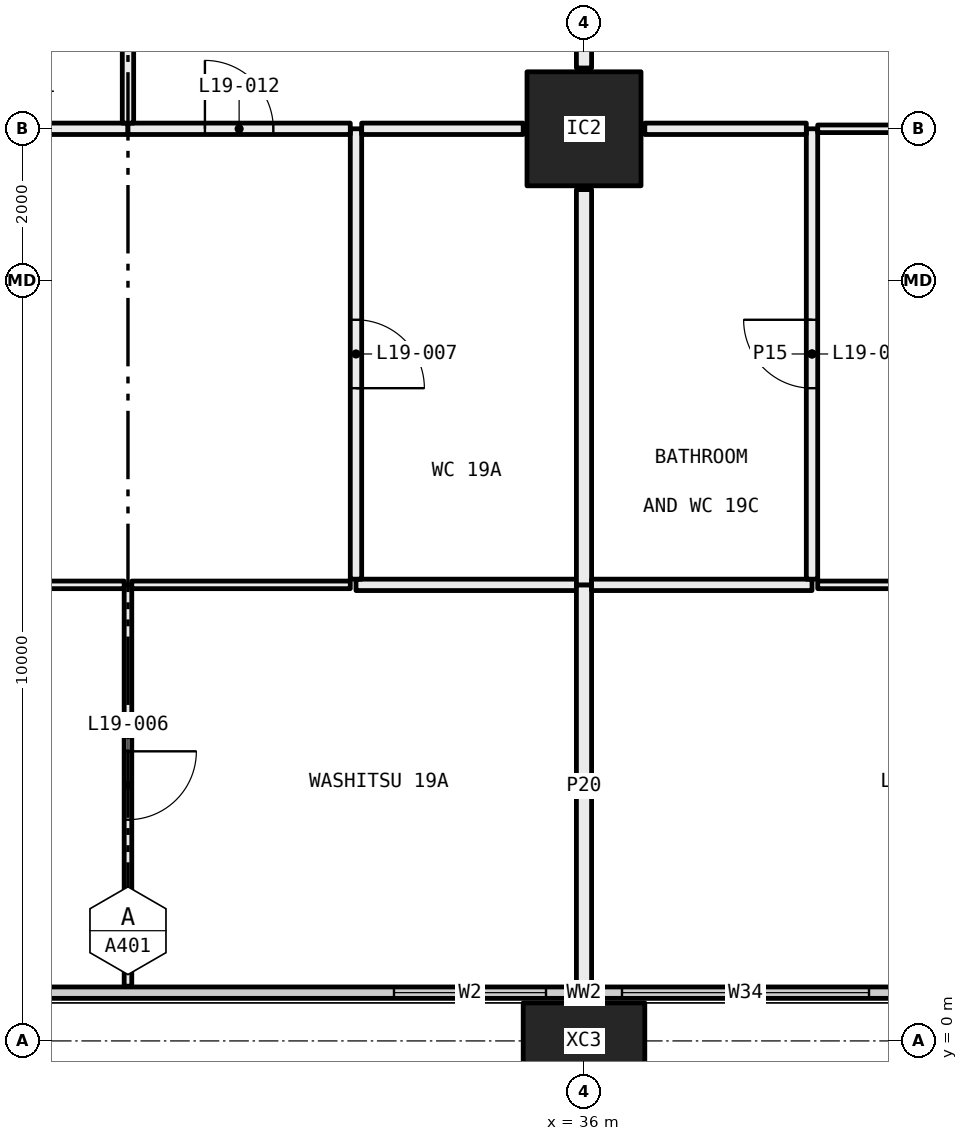
"""IFC4 building model, lengths in metres.
Left out: names, types, materials, properties, quantities, classifications, styles, units other than length and angle.
Written with IfcOpenShell. Run it as: python <this file> out.ifc"""

import sys

from ifc_helpers import new_model, si_unit, direction, frame, frame_2d, origin, origin_2d, place, context, subcontext, project, spatial, rectangle, hollow_rectangle, extrude, element, fill, save


model = new_model("IFC4")
c1 = context("Model", 3, precision=1e-05, world=origin(), true_north=direction((0.0, 1.0)))
c2 = subcontext(c1, "Body", "Model", "MODEL_VIEW")
j1 = project(units=[si_unit("LENGTHUNIT", "METRE"), si_unit("PLANEANGLEUNIT", "RADIAN")], contexts=[c1])
p1 = place(None, origin())
s1 = spatial("IfcSite", under=j1, at=p1, CompositionType="ELEMENT")
p2 = place(p1, origin())
s2 = spatial("IfcBuilding", under=s1, at=p2, CompositionType="ELEMENT")
p3 = place(p2, frame((0.0, 0.0, 78.3)))
s3 = spatial("IfcBuildingStorey", under=s2, at=p3, CompositionType="ELEMENT", Elevation=78.3)
p4 = place(p3, frame((36.0, 0.0, -0.4), z_axis=(0.0, 0.0, 1.0), x_axis=(1.0, 0.0, 0.0)))
e1 = element("IfcColumn", 1, at=p4, inside=s3, PredefinedType="COLUMN", context=c2, shape_type="SweptSolid", body=[
    extrude(hollow_rectangle(XDim=1.6, YDim=1.0, WallThickness=0.065, at=origin_2d()), origin(), (0.0, 0.0, 1.0), 3.45),
])
p5 = place(p3, frame((36.0, 12.0, 0.0), z_axis=(0.0, 0.0, 1.0), x_axis=(1.0, 0.0, 0.0)))
e2 = element("IfcColumn", 2, at=p5, inside=s3, PredefinedType="COLUMN", context=c2, shape_type="SweptSolid", body=[
    extrude(hollow_rectangle(XDim=1.5, YDim=1.5, WallThickness=0.065, at=origin_2d()), origin(), (0.0, 0.0, 1.0), 3.05),
])
p6 = place(p3, frame((6.56, 0.635, 0.0), z_axis=(0.0, 0.0, 1.0), x_axis=(1.0, 0.0, 0.0)))
e3 = element("IfcWall", 3, at=p6, inside=s3, PredefinedType="ELEMENTEDWALL", context=c2, shape_type="SweptSolid", body=[
    extrude(rectangle(XDim=58.88, YDim=0.15, at=frame_2d((29.44, 0.0))), origin(), (0.0, 0.0, 1.0), 3.05),
])
p7 = place(p6, frame((0.44, 0.0, 0.45)))
e4 = element("IfcOpeningElement", 4, at=p7, cuts=e3, PredefinedType="OPENING", context=c2, shape_type="SweptSolid", body=[
    extrude(rectangle(XDim=4.5, YDim=2.55, at=frame_2d((2.25, 1.275))), frame((0.0, 0.085, 0.0), z_axis=(0.0, -1.0, 0.0), x_axis=(1.0, 0.0, 0.0)), (0.0, 0.0, 1.0), 0.17),
])
p8 = place(p6, frame((5.94, 0.0, 0.45)))
e5 = element("IfcOpeningElement", 5, at=p8, cuts=e3, PredefinedType="OPENING", context=c2, shape_type="SweptSolid", body=[
    extrude(rectangle(XDim=3.25, YDim=2.55, at=frame_2d((1.625, 1.275))), frame((0.0, 0.085, 0.0), z_axis=(0.0, -1.0, 0.0), x_axis=(1.0, 0.0, 0.0)), (0.0, 0.0, 1.0), 0.17),
])
p9 = place(p6, frame((13.69, 0.0, 0.45)))
e6 = element("IfcOpeningElement", 6, at=p9, cuts=e3, PredefinedType="OPENING", context=c2, shape_type="SweptSolid", body=[
    extrude(rectangle(XDim=3.25, YDim=2.55, at=frame_2d((1.625, 1.275))), frame((0.0, 0.085, 0.0), z_axis=(0.0, -1.0, 0.0), x_axis=(1.0, 0.0, 0.0)), (0.0, 0.0, 1.0), 0.17),
])
p10 = place(p6, frame((17.94, 0.0, 0.45)))
e7 = element("IfcOpeningElement", 7, at=p10, cuts=e3, PredefinedType="OPENING", context=c2, shape_type="SweptSolid", body=[
    extrude(rectangle(XDim=3.25, YDim=2.55, at=frame_2d((1.625, 1.275))), frame((0.0, 0.085, 0.0), z_axis=(0.0, -1.0, 0.0), x_axis=(1.0, 0.0, 0.0)), (0.0, 0.0, 1.0), 0.17),
])
p11 = place(p6, frame((26.94, 0.0, 0.45)))
e8 = element("IfcOpeningElement", 8, at=p11, cuts=e3, PredefinedType="OPENING", context=c2, shape_type="SweptSolid", body=[
    extrude(rectangle(XDim=2.0, YDim=2.55, at=frame_2d((1.0, 1.275))), frame((0.0, 0.085, 0.0), z_axis=(0.0, -1.0, 0.0), x_axis=(1.0, 0.0, 0.0)), (0.0, 0.0, 1.0), 0.17),
])
p12 = place(p6, frame((29.94, 0.0, 0.45)))
e9 = element("IfcOpeningElement", 9, at=p12, cuts=e3, PredefinedType="OPENING", context=c2, shape_type="SweptSolid", body=[
    extrude(rectangle(XDim=3.25, YDim=2.55, at=frame_2d((1.625, 1.275))), frame((0.0, 0.085, 0.0), z_axis=(0.0, -1.0, 0.0), x_axis=(1.0, 0.0, 0.0)), (0.0, 0.0, 1.0), 0.17),
])
p13 = place(p6, frame((37.69, 0.0, 0.45)))
e10 = element("IfcOpeningElement", 10, at=p13, cuts=e3, PredefinedType="OPENING", context=c2, shape_type="SweptSolid", body=[
    extrude(rectangle(XDim=3.25, YDim=2.55, at=frame_2d((1.625, 1.275))), frame((0.0, 0.085, 0.0), z_axis=(0.0, -1.0, 0.0), x_axis=(1.0, 0.0, 0.0)), (0.0, 0.0, 1.0), 0.17),
])
p14 = place(p6, frame((41.94, 0.0, 0.45)))
e11 = element("IfcOpeningElement", 11, at=p14, cuts=e3, PredefinedType="OPENING", context=c2, shape_type="SweptSolid", body=[
    extrude(rectangle(XDim=3.25, YDim=2.55, at=frame_2d((1.625, 1.275))), frame((0.0, 0.085, 0.0), z_axis=(0.0, -1.0, 0.0), x_axis=(1.0, 0.0, 0.0)), (0.0, 0.0, 1.0), 0.17),
])
p15 = place(p6, frame((50.94, 0.0, 0.45)))
e12 = element("IfcOpeningElement", 12, at=p15, cuts=e3, PredefinedType="OPENING", context=c2, shape_type="SweptSolid", body=[
    extrude(rectangle(XDim=2.0, YDim=2.55, at=frame_2d((1.0, 1.275))), frame((0.0, 0.085, 0.0), z_axis=(0.0, -1.0, 0.0), x_axis=(1.0, 0.0, 0.0)), (0.0, 0.0, 1.0), 0.17),
])
p16 = place(p6, frame((53.94, 0.0, 0.45)))
e13 = element("IfcOpeningElement", 13, at=p16, cuts=e3, PredefinedType="OPENING", context=c2, shape_type="SweptSolid", body=[
    extrude(rectangle(XDim=4.5, YDim=2.55, at=frame_2d((2.25, 1.275))), frame((0.0, 0.085, 0.0), z_axis=(0.0, -1.0, 0.0), x_axis=(1.0, 0.0, 0.0)), (0.0, 0.0, 1.0), 0.17),
])
p17 = place(p3, frame((30.0, 0.72, 0.0), z_axis=(0.0, 0.0, 1.0), x_axis=(0.0, 1.0, 0.0)))
e14 = element("IfcWall", 14, at=p17, inside=s3, PredefinedType="PARTITIONING", context=c2, shape_type="SweptSolid", body=[
    extrude(rectangle(XDim=5.28, YDim=0.1, at=frame_2d((2.64, 0.0))), origin(), (0.0, 0.0, 1.0), 3.05),
])
p18 = place(p17, frame((2.19, 0.0, 0.0)))
e15 = element("IfcOpeningElement", 15, at=p18, cuts=e14, PredefinedType="OPENING", context=c2, shape_type="SweptSolid", body=[
    extrude(rectangle(XDim=0.9, YDim=2.1, at=frame_2d((0.45, 1.05))), frame((0.0, 0.06, 0.0), z_axis=(0.0, -1.0, 0.0), x_axis=(1.0, 0.0, 0.0)), (0.0, 0.0, 1.0), 0.12),
])
p19 = place(p3, frame((29.95, 6.0, 0.0), z_axis=(0.0, 0.0, 1.0), x_axis=(-1.0, 0.0, 0.0)))
e16 = element("IfcWall", 16, at=p19, inside=s3, PredefinedType="PARTITIONING", context=c2, shape_type="SweptSolid", body=[
    extrude(rectangle(XDim=6.05, YDim=0.1, at=frame_2d((3.025, 0.0))), origin(), (0.0, 0.0, 1.0), 2.45),
])
p20 = place(p19, frame((2.575, 0.0, 0.0)))
e17 = element("IfcOpeningElement", 17, at=p20, cuts=e16, PredefinedType="OPENING", context=c2, shape_type="SweptSolid", body=[
    extrude(rectangle(XDim=0.9, YDim=2.1, at=frame_2d((0.45, 1.05))), frame((0.0, 0.06, 0.0), z_axis=(0.0, -1.0, 0.0), x_axis=(1.0, 0.0, 0.0)), (0.0, 0.0, 1.0), 0.12),
])
p21 = place(p3, frame((32.925, 6.0, 0.0), z_axis=(0.0, 0.0, 1.0), x_axis=(-1.0, 0.0, 0.0)))
e18 = element("IfcWall", 18, at=p21, inside=s3, PredefinedType="PARTITIONING", context=c2, shape_type="SweptSolid", body=[
    extrude(rectangle(XDim=2.875, YDim=0.1, at=frame_2d((1.438, 0.0))), origin(), (0.0, 0.0, 1.0), 3.05),
])
p22 = place(p3, frame((35.9, 6.0, 0.0), z_axis=(0.0, 0.0, 1.0), x_axis=(-1.0, 0.0, 0.0)))
e19 = element("IfcWall", 19, at=p22, inside=s3, PredefinedType="PARTITIONING", context=c2, shape_type="SweptSolid", body=[
    extrude(rectangle(XDim=2.9, YDim=0.15, at=frame_2d((1.45, 0.0))), origin(), (0.0, 0.0, 1.0), 3.05),
])
p23 = place(p3, frame((36.0, 0.72, 0.0), z_axis=(0.0, 0.0, 1.0), x_axis=(0.0, 1.0, 0.0)))
e20 = element("IfcWall", 20, at=p23, inside=s3, PredefinedType="PARTITIONING", context=c2, shape_type="SweptSolid", body=[
    extrude(rectangle(XDim=5.28, YDim=0.2, at=frame_2d((2.64, 0.0))), origin(), (0.0, 0.0, 1.0), 2.45),
])
p24 = place(p3, frame((33.0, 6.075, 0.0), z_axis=(0.0, 0.0, 1.0), x_axis=(0.0, 1.0, 0.0)))
e21 = element("IfcWall", 21, at=p24, inside=s3, PredefinedType="PARTITIONING", context=c2, shape_type="SweptSolid", body=[
    extrude(rectangle(XDim=5.925, YDim=0.15, at=frame_2d((2.962, 0.0))), origin(), (0.0, 0.0, 1.0), 2.45),
])
p25 = place(p24, frame((2.512, 0.0, 0.0)))
e22 = element("IfcOpeningElement", 22, at=p25, cuts=e21, PredefinedType="OPENING", context=c2, shape_type="SweptSolid", body=[
    extrude(rectangle(XDim=0.9, YDim=2.1, at=frame_2d((0.45, 1.05))), frame((0.0, 0.085, 0.0), z_axis=(0.0, -1.0, 0.0), x_axis=(1.0, 0.0, 0.0)), (0.0, 0.0, 1.0), 0.17),
])
p26 = place(p3, frame((30.0, 12.0, 0.0), z_axis=(0.0, 0.0, 1.0), x_axis=(-1.0, 0.0, 0.0)))
e23 = element("IfcWall", 23, at=p26, inside=s3, PredefinedType="PARTITIONING", context=c2, shape_type="SweptSolid", body=[
    extrude(rectangle(XDim=3.0, YDim=0.15, at=frame_2d((1.5, 0.0))), origin(), (0.0, 0.0, 1.0), 2.45),
])
p27 = place(p26, frame((1.05, 0.0, 0.0)))
e24 = element("IfcOpeningElement", 24, at=p27, cuts=e23, PredefinedType="OPENING", context=c2, shape_type="SweptSolid", body=[
    extrude(rectangle(XDim=0.9, YDim=2.1, at=frame_2d((0.45, 1.05))), frame((0.0, 0.085, 0.0), z_axis=(0.0, -1.0, 0.0), x_axis=(1.0, 0.0, 0.0)), (0.0, 0.0, 1.0), 0.17),
])
p28 = place(p3, frame((32.925, 12.0, 0.0), z_axis=(0.0, 0.0, 1.0), x_axis=(-1.0, 0.0, 0.0)))
e25 = element("IfcWall", 25, at=p28, inside=s3, PredefinedType="PARTITIONING", context=c2, shape_type="SweptSolid", body=[
    extrude(rectangle(XDim=2.925, YDim=0.15, at=frame_2d((1.462, 0.0))), origin(), (0.0, 0.0, 1.0), 2.45),
])
p29 = place(p28, frame((1.012, 0.0, 0.0)))
e26 = element("IfcOpeningElement", 26, at=p29, cuts=e25, PredefinedType="OPENING", context=c2, shape_type="SweptSolid", body=[
    extrude(rectangle(XDim=0.9, YDim=2.1, at=frame_2d((0.45, 1.05))), frame((0.0, 0.085, 0.0), z_axis=(0.0, -1.0, 0.0), x_axis=(1.0, 0.0, 0.0)), (0.0, 0.0, 1.0), 0.17),
])
p30 = place(p3, frame((35.2, 12.0, 0.0), z_axis=(0.0, 0.0, 1.0), x_axis=(-1.0, 0.0, 0.0)))
e27 = element("IfcWall", 27, at=p30, inside=s3, PredefinedType="PARTITIONING", context=c2, shape_type="SweptSolid", body=[
    extrude(rectangle(XDim=2.125, YDim=0.15, at=frame_2d((1.062, 0.0))), origin(), (0.0, 0.0, 1.0), 2.45),
])
p31 = place(p3, frame((36.0, 6.0, 0.0), z_axis=(0.0, 0.0, 1.0), x_axis=(0.0, 1.0, 0.0)))
e28 = element("IfcWall", 28, at=p31, inside=s3, PredefinedType="PARTITIONING", context=c2, shape_type="SweptSolid", body=[
    extrude(rectangle(XDim=5.2, YDim=0.2, at=frame_2d((2.6, 0.0))), origin(), (0.0, 0.0, 1.0), 2.45),
])
p32 = place(p3, frame((30.0, 12.075, 0.0), z_axis=(0.0, 0.0, 1.0), x_axis=(0.0, 1.0, 0.0)))
e29 = element("IfcWall", 29, at=p32, inside=s3, PredefinedType="PARTITIONING", context=c2, shape_type="SweptSolid", body=[
    extrude(rectangle(XDim=5.925, YDim=0.15, at=frame_2d((2.962, 0.0))), origin(), (0.0, 0.0, 1.0), 2.45),
])
p33 = place(p3, frame((36.0, 12.8, 0.0), z_axis=(0.0, 0.0, 1.0), x_axis=(0.0, 1.0, 0.0)))
e30 = element("IfcWall", 30, at=p33, inside=s3, PredefinedType="PARTITIONING", context=c2, shape_type="SweptSolid", body=[
    extrude(rectangle(XDim=5.2, YDim=0.2, at=frame_2d((2.6, 0.0))), origin(), (0.0, 0.0, 1.0), 2.45),
])
p34 = place(p3, frame((39.0, 6.0, 0.0), z_axis=(0.0, 0.0, 1.0), x_axis=(-1.0, 0.0, 0.0)))
e31 = element("IfcWall", 31, at=p34, inside=s3, PredefinedType="PARTITIONING", context=c2, shape_type="SweptSolid", body=[
    extrude(rectangle(XDim=2.9, YDim=0.15, at=frame_2d((1.45, 0.0))), origin(), (0.0, 0.0, 1.0), 3.05),
])
p35 = place(p3, frame((47.95, 6.0, 0.0), z_axis=(0.0, 0.0, 1.0), x_axis=(-1.0, 0.0, 0.0)))
e32 = element("IfcWall", 32, at=p35, inside=s3, PredefinedType="PARTITIONING", context=c2, shape_type="SweptSolid", body=[
    extrude(rectangle(XDim=8.875, YDim=0.1, at=frame_2d((4.438, 0.0))), origin(), (0.0, 0.0, 1.0), 2.45),
])
p36 = place(p35, frame((3.988, 0.0, 0.0)))
e33 = element("IfcOpeningElement", 33, at=p36, cuts=e32, PredefinedType="OPENING", context=c2, shape_type="SweptSolid", body=[
    extrude(rectangle(XDim=0.9, YDim=2.1, at=frame_2d((0.45, 1.05))), frame((0.0, 0.06, 0.0), z_axis=(0.0, -1.0, 0.0), x_axis=(1.0, 0.0, 0.0)), (0.0, 0.0, 1.0), 0.12),
])
p37 = place(p3, frame((39.0, 6.075, 0.0), z_axis=(0.0, 0.0, 1.0), x_axis=(0.0, 1.0, 0.0)))
e34 = element("IfcWall", 34, at=p37, inside=s3, PredefinedType="PARTITIONING", context=c2, shape_type="SweptSolid", body=[
    extrude(rectangle(XDim=5.925, YDim=0.15, at=frame_2d((2.962, 0.0))), origin(), (0.0, 0.0, 1.0), 2.45),
])
p38 = place(p37, frame((2.512, 0.0, 0.0)))
e35 = element("IfcOpeningElement", 35, at=p38, cuts=e34, PredefinedType="OPENING", context=c2, shape_type="SweptSolid", body=[
    extrude(rectangle(XDim=0.9, YDim=2.1, at=frame_2d((0.45, 1.05))), frame((0.0, 0.085, 0.0), z_axis=(0.0, -1.0, 0.0), x_axis=(1.0, 0.0, 0.0)), (0.0, 0.0, 1.0), 0.17),
])
p39 = place(p3, frame((38.925, 12.0, 0.0), z_axis=(0.0, 0.0, 1.0), x_axis=(-1.0, 0.0, 0.0)))
e36 = element("IfcWall", 36, at=p39, inside=s3, PredefinedType="PARTITIONING", context=c2, shape_type="SweptSolid", body=[
    extrude(rectangle(XDim=2.125, YDim=0.15, at=frame_2d((1.062, 0.0))), origin(), (0.0, 0.0, 1.0), 2.45),
])
p40 = place(p3, frame((45.0, 12.0, 0.0), z_axis=(0.0, 0.0, 1.0), x_axis=(-1.0, 0.0, 0.0)))
e37 = element("IfcWall", 37, at=p40, inside=s3, PredefinedType="PARTITIONING", context=c2, shape_type="SweptSolid", body=[
    extrude(rectangle(XDim=5.925, YDim=0.1, at=frame_2d((2.962, 0.0))), origin(), (0.0, 0.0, 1.0), 2.45),
])
p41 = place(p40, frame((2.512, 0.0, 0.0)))
e38 = element("IfcOpeningElement", 38, at=p41, cuts=e37, PredefinedType="OPENING", context=c2, shape_type="SweptSolid", body=[
    extrude(rectangle(XDim=0.9, YDim=2.1, at=frame_2d((0.45, 1.05))), frame((0.0, 0.06, 0.0), z_axis=(0.0, -1.0, 0.0), x_axis=(1.0, 0.0, 0.0)), (0.0, 0.0, 1.0), 0.12),
])
p42 = place(p11, origin())
e39 = element("IfcWindow", 39, at=p42, inside=s3, PartitioningType="SINGLE_PANEL", PredefinedType="WINDOW", context=c2, shape_type="SweptSolid", body=[
    extrude(rectangle(XDim=2.0, YDim=2.55, at=frame_2d((1.0, 1.275))), frame((0.0, 0.03, 0.0), z_axis=(0.0, -1.0, 0.0), x_axis=(1.0, 0.0, 0.0)), (0.0, 0.0, 1.0), 0.06),
])
fill(e8, e39)
p43 = place(p12, origin())
e40 = element("IfcWindow", 40, at=p43, inside=s3, PartitioningType="SINGLE_PANEL", PredefinedType="WINDOW", context=c2, shape_type="SweptSolid", body=[
    extrude(rectangle(XDim=3.25, YDim=2.55, at=frame_2d((1.625, 1.275))), frame((0.0, 0.03, 0.0), z_axis=(0.0, -1.0, 0.0), x_axis=(1.0, 0.0, 0.0)), (0.0, 0.0, 1.0), 0.06),
])
fill(e9, e40)
p44 = place(p18, frame((0.9, 0.0, 0.0), x_axis=(-1.0, 0.0, 0.0)))
e41 = element("IfcDoor", 41, at=p44, inside=s3, OperationType="SINGLE_SWING_RIGHT", PredefinedType="DOOR", context=c2, shape_type="SweptSolid", body=[
    extrude(rectangle(XDim=0.9, YDim=2.1, at=frame_2d((0.45, 1.05))), frame((0.0, 0.025, 0.0), z_axis=(0.0, -1.0, 0.0), x_axis=(1.0, 0.0, 0.0)), (0.0, 0.0, 1.0), 0.05),
])
fill(e15, e41)
p45 = place(p25, frame((0.9, 0.0, 0.0), x_axis=(-1.0, 0.0, 0.0)))
e42 = element("IfcDoor", 42, at=p45, inside=s3, OperationType="SINGLE_SWING_LEFT", PredefinedType="DOOR", context=c2, shape_type="SweptSolid", body=[
    extrude(rectangle(XDim=0.9, YDim=2.1, at=frame_2d((0.45, 1.05))), frame((0.0, 0.025, 0.0), z_axis=(0.0, -1.0, 0.0), x_axis=(1.0, 0.0, 0.0)), (0.0, 0.0, 1.0), 0.05),
])
fill(e22, e42)
p46 = place(p29, frame((0.9, 0.0, 0.0), x_axis=(-1.0, 0.0, 0.0)))
e43 = element("IfcDoor", 43, at=p46, inside=s3, OperationType="SINGLE_SWING_RIGHT", PredefinedType="DOOR", context=c2, shape_type="SweptSolid", body=[
    extrude(rectangle(XDim=0.9, YDim=2.1, at=frame_2d((0.45, 1.05))), frame((0.0, 0.025, 0.0), z_axis=(0.0, -1.0, 0.0), x_axis=(1.0, 0.0, 0.0)), (0.0, 0.0, 1.0), 0.05),
])
fill(e26, e43)
p47 = place(p38, origin())
e44 = element("IfcDoor", 44, at=p47, inside=s3, OperationType="SINGLE_SWING_LEFT", PredefinedType="DOOR", context=c2, shape_type="SweptSolid", body=[
    extrude(rectangle(XDim=0.9, YDim=2.1, at=frame_2d((0.45, 1.05))), frame((0.0, 0.025, 0.0), z_axis=(0.0, -1.0, 0.0), x_axis=(1.0, 0.0, 0.0)), (0.0, 0.0, 1.0), 0.05),
])
fill(e35, e44)
save(model, sys.argv[1])
